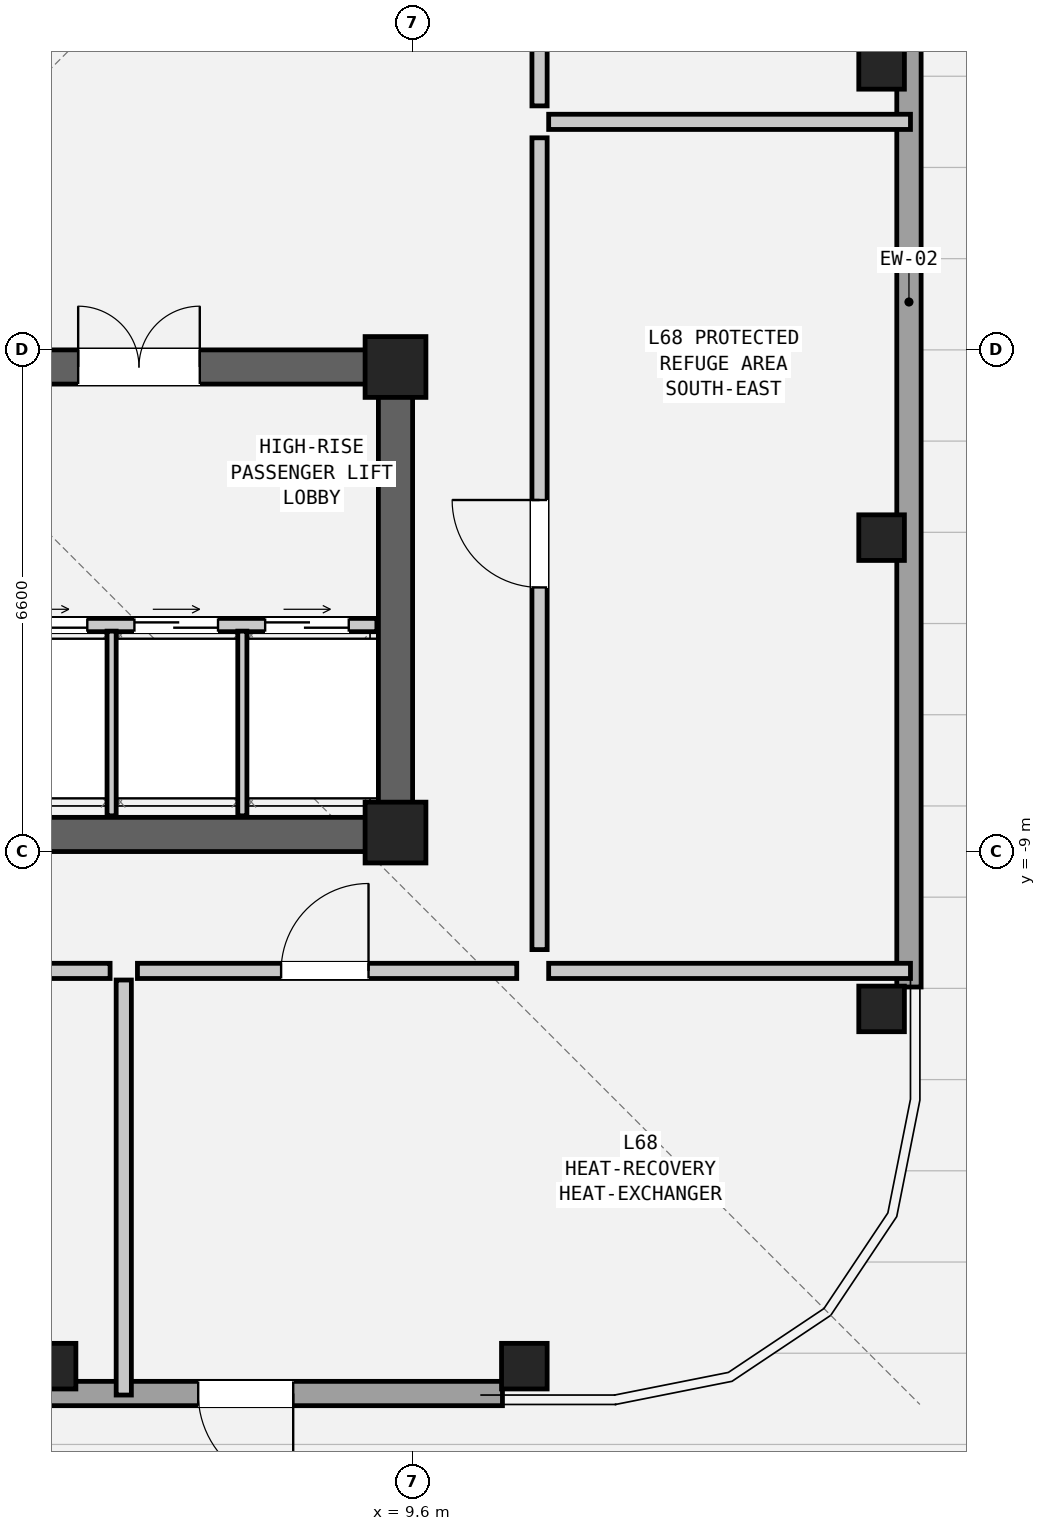
"""IFC4 building model, lengths in metres.
Left out: names, types, materials, properties, quantities, classifications, styles, units other than length and angle.
Written with IfcOpenShell. Run it as: python <this file> out.ifc"""

import sys

from ifc_helpers import new_model, si_unit, direction, frame, frame_2d, origin, origin_2d, place, context, subcontext, project, spatial, rectangle, hollow_rectangle, extrude, element, fill, save


model = new_model("IFC4")
c1 = context("Model", 3, precision=1e-05, world=origin(), true_north=direction((0.0, 1.0)))
c2 = subcontext(c1, "Body", "Model", "MODEL_VIEW")
j1 = project(units=[si_unit("LENGTHUNIT", "METRE"), si_unit("PLANEANGLEUNIT", "RADIAN")], contexts=[c1])
p1 = place(None, origin())
s1 = spatial("IfcSite", under=j1, at=p1, CompositionType="ELEMENT")
p2 = place(p1, origin())
s2 = spatial("IfcBuilding", under=s1, at=p2, CompositionType="ELEMENT")
p3 = place(p2, frame((0.0, 0.0, 231.3)))
s3 = spatial("IfcBuildingStorey", under=s2, at=p3, CompositionType="ELEMENT", Elevation=231.3)
p4 = place(p3, frame((-9.6, -8.775, 0.0), z_axis=(0.0, 0.0, 1.0), x_axis=(1.0, 0.0, 0.0)))
e1 = element("IfcWall", 1, at=p4, inside=s3, PredefinedType="SHEAR", context=c2, shape_type="SweptSolid", body=[
    extrude(rectangle(XDim=19.2, YDim=0.45, at=frame_2d((9.6, 0.0))), origin(), (0.0, 0.0, 1.0), 3.6),
])
p5 = place(p3, frame((-9.6, -2.625, 0.0), z_axis=(0.0, 0.0, 1.0), x_axis=(1.0, 0.0, 0.0)))
e2 = element("IfcWall", 2, at=p5, inside=s3, PredefinedType="SHEAR", context=c2, shape_type="SweptSolid", body=[
    extrude(rectangle(XDim=19.2, YDim=0.45, at=frame_2d((9.6, 0.0))), origin(), (0.0, 0.0, 1.0), 3.6),
])
p6 = place(p5, frame((3.8, 0.0, 0.0)))
e3 = element("IfcOpeningElement", 3, at=p6, cuts=e2, PredefinedType="OPENING", context=c2, shape_type="SweptSolid", body=[
    extrude(rectangle(XDim=1.1, YDim=2.08, at=frame_2d((0.55, 1.04))), frame((0.0, 0.237, 0.0), z_axis=(0.0, -1.0, 0.0), x_axis=(1.0, 0.0, 0.0)), (0.0, 0.0, 1.0), 0.474),
])
p7 = place(p5, frame((10.15, 0.0, 0.0)))
e4 = element("IfcOpeningElement", 4, at=p7, cuts=e2, PredefinedType="OPENING", context=c2, shape_type="SweptSolid", body=[
    extrude(rectangle(XDim=0.9, YDim=2.05, at=frame_2d((0.45, 1.025))), frame((0.0, 0.237, 0.0), z_axis=(0.0, -1.0, 0.0), x_axis=(1.0, 0.0, 0.0)), (0.0, 0.0, 1.0), 0.474),
])
p8 = place(p5, frame((12.1, 0.0, 0.0)))
e5 = element("IfcOpeningElement", 5, at=p8, cuts=e2, PredefinedType="OPENING", context=c2, shape_type="SweptSolid", body=[
    extrude(rectangle(XDim=0.95, YDim=2.1, at=frame_2d((0.475, 1.05))), frame((0.0, 0.237, 0.0), z_axis=(0.0, -1.0, 0.0), x_axis=(1.0, 0.0, 0.0)), (0.0, 0.0, 1.0), 0.474),
])
p9 = place(p5, frame((14.8, 0.0, 0.0)))
e6 = element("IfcOpeningElement", 6, at=p9, cuts=e2, PredefinedType="OPENING", context=c2, shape_type="SweptSolid", body=[
    extrude(rectangle(XDim=1.6, YDim=2.12, at=frame_2d((0.8, 1.06))), frame((0.0, 0.237, 0.0), z_axis=(0.0, -1.0, 0.0), x_axis=(1.0, 0.0, 0.0)), (0.0, 0.0, 1.0), 0.474),
])
p10 = place(p3, frame((9.375, -9.0, 0.0), z_axis=(0.0, 0.0, 1.0), x_axis=(0.0, 1.0, 0.0)))
e7 = element("IfcWall", 7, at=p10, inside=s3, PredefinedType="SHEAR", context=c2, shape_type="SweptSolid", body=[
    extrude(rectangle(XDim=6.6, YDim=0.45, at=frame_2d((3.3, 0.0))), origin(), (0.0, 0.0, 1.0), 3.6),
])
for number, where, z_axis, x_axis in (
    (8, (4.87, -15.77, 0.0), (0.0, 0.0, 1.0), (1.0, 0.0, 0.0)),
    (9, (11.07, -15.77, 0.0), (0.0, 0.0, 1.0), (1.0, 0.0, 0.0)),
    (10, (15.77, -11.07, 0.0), (0.0, 0.0, 1.0), (0.0, 1.0, 0.0)),
    (11, (15.77, -4.87, 0.0), (0.0, 0.0, 1.0), (0.0, 1.0, 0.0)),
    (12, (15.77, 1.33, 0.0), (0.0, 0.0, 1.0), (0.0, 1.0, 0.0)),
):
    element("IfcColumn", number, at=place(p3, frame(where, z_axis=z_axis, x_axis=x_axis)), inside=s3, PredefinedType="COLUMN", context=c2, shape_type="SweptSolid", body=[
        extrude(hollow_rectangle(XDim=0.6, YDim=0.6, WallThickness=0.04, at=origin_2d()), origin(), (0.0, 0.0, 1.0), 3.6),
    ])
for number, where, z_axis, x_axis in (
    (13, (9.375, -2.625, 0.0), (0.0, 0.0, 1.0), (1.0, 0.0, 0.0)),
    (14, (9.375, -8.75, 0.0), (0.0, 0.0, 1.0), (1.0, 0.0, 0.0)),
):
    element("IfcColumn", number, at=place(p3, frame(where, z_axis=z_axis, x_axis=x_axis)), inside=s3, PredefinedType="COLUMN", context=c2, shape_type="SweptSolid", body=[
        extrude(rectangle(XDim=0.8, YDim=0.8, at=origin_2d()), origin(), (0.0, 0.0, 1.0), 3.6),
    ])
p11 = place(p3, frame((10.782, -16.13, 0.0), z_axis=(0.0, 0.0, 1.0), x_axis=(-1.0, 0.0, 0.0)))
e15 = element("IfcWall", 15, at=p11, inside=s3, PredefinedType="SOLIDWALL", context=c2, shape_type="SweptSolid", body=[
    extrude(rectangle(XDim=18.024, YDim=0.32, at=frame_2d((9.012, 0.0))), origin(), (0.0, 0.0, 1.0), 2.182),
])
p12 = place(p11, frame((2.753, 0.0, 0.0)))
e16 = element("IfcOpeningElement", 16, at=p12, cuts=e15, PredefinedType="OPENING", context=c2, shape_type="SweptSolid", body=[
    extrude(rectangle(XDim=1.25, YDim=2.02, at=frame_2d((0.625, 1.01))), frame((0.0, 0.172, 0.0), z_axis=(0.0, -1.0, 0.0), x_axis=(1.0, 0.0, 0.0)), (0.0, 0.0, 1.0), 0.344),
])
p13 = place(p3, frame((16.13, 7.242, 0.0), z_axis=(0.0, 0.0, 1.0), x_axis=(0.0, -1.0, 0.0)))
e17 = element("IfcWall", 17, at=p13, inside=s3, PredefinedType="SOLIDWALL", context=c2, shape_type="SweptSolid", body=[
    extrude(rectangle(XDim=18.024, YDim=0.32, at=frame_2d((9.012, 0.0))), origin(), (0.0, 0.0, 1.0), 2.182),
])
p14 = place(p3, frame((4.0, -6.02, 0.0), z_axis=(0.0, 0.0, 1.0), x_axis=(1.0, 0.0, 0.0)))
e18 = element("IfcWall", 18, at=p14, inside=s3, PredefinedType="PARTITIONING", context=c2, shape_type="SweptSolid", body=[
    extrude(rectangle(XDim=5.13, YDim=0.175, at=frame_2d((2.565, 0.0))), origin(), (0.0, 0.0, 1.0), 3.32),
])
p15 = place(p14, frame((0.22, 0.0, 0.0)))
e19 = element("IfcOpeningElement", 19, at=p15, cuts=e18, PredefinedType="OPENING", context=c2, shape_type="SweptSolid", body=[
    extrude(rectangle(XDim=1.1, YDim=2.06, at=frame_2d((0.55, 1.03))), frame((0.0, 0.1, 0.0), z_axis=(0.0, -1.0, 0.0), x_axis=(1.0, 0.0, 0.0)), (0.0, 0.0, 1.0), 0.199),
])
p16 = place(p14, frame((1.94, 0.0, 0.0)))
e20 = element("IfcOpeningElement", 20, at=p16, cuts=e18, PredefinedType="OPENING", context=c2, shape_type="SweptSolid", body=[
    extrude(rectangle(XDim=1.1, YDim=2.06, at=frame_2d((0.55, 1.03))), frame((0.0, 0.1, 0.0), z_axis=(0.0, -1.0, 0.0), x_axis=(1.0, 0.0, 0.0)), (0.0, 0.0, 1.0), 0.199),
])
p17 = place(p14, frame((3.66, 0.0, 0.0)))
e21 = element("IfcOpeningElement", 21, at=p17, cuts=e18, PredefinedType="OPENING", context=c2, shape_type="SweptSolid", body=[
    extrude(rectangle(XDim=1.1, YDim=2.06, at=frame_2d((0.55, 1.03))), frame((0.0, 0.1, 0.0), z_axis=(0.0, -1.0, 0.0), x_axis=(1.0, 0.0, 0.0)), (0.0, 0.0, 1.0), 0.199),
])
for number, where, z_axis, x_axis in (
    (22, (5.64, -8.53, 0.0), (0.0, 0.0, 1.0), (0.0, 1.0, 0.0)),
    (23, (7.36, -8.53, 0.0), (0.0, 0.0, 1.0), (0.0, 1.0, 0.0)),
):
    element("IfcWall", number, at=place(p3, frame(where, z_axis=z_axis, x_axis=x_axis)), inside=s3, PredefinedType="PARTITIONING", context=c2, shape_type="SweptSolid", body=[
        extrude(rectangle(XDim=2.43, YDim=0.12, at=frame_2d((1.215, 0.0))), origin(), (0.0, 0.0, 1.0), 3.32),
    ])
p18 = place(p3, frame((0.53, -10.57, 0.0), z_axis=(0.0, 0.0, 1.0), x_axis=(1.0, 0.0, 0.0)))
e24 = element("IfcWall", 24, at=p18, inside=s3, PredefinedType="PARTITIONING", context=c2, shape_type="SweptSolid", body=[
    extrude(rectangle(XDim=5.09, YDim=0.2, at=frame_2d((2.545, 0.0))), origin(), (0.0, 0.0, 1.0), 3.32),
])
p19 = place(p18, frame((1.97, 0.0, 0.0)))
e25 = element("IfcOpeningElement", 25, at=p19, cuts=e24, PredefinedType="OPENING", context=c2, shape_type="SweptSolid", body=[
    extrude(rectangle(XDim=1.15, YDim=2.1, at=frame_2d((0.575, 1.05))), frame((0.0, 0.112, 0.0), z_axis=(0.0, -1.0, 0.0), x_axis=(1.0, 0.0, 0.0)), (0.0, 0.0, 1.0), 0.224),
])
p20 = place(p3, frame((5.8, -16.15, 0.0), z_axis=(0.0, 0.0, 1.0), x_axis=(0.0, 1.0, 0.0)))
e26 = element("IfcWall", 26, at=p20, inside=s3, PredefinedType="PARTITIONING", context=c2, shape_type="SweptSolid", body=[
    extrude(rectangle(XDim=5.46, YDim=0.2, at=frame_2d((2.73, 0.0))), origin(), (0.0, 0.0, 1.0), 2.538),
])
p21 = place(p3, frame((5.98, -10.57, 0.0), z_axis=(0.0, 0.0, 1.0), x_axis=(1.0, 0.0, 0.0)))
e27 = element("IfcWall", 27, at=p21, inside=s3, PredefinedType="PARTITIONING", context=c2, shape_type="SweptSolid", body=[
    extrude(rectangle(XDim=4.99, YDim=0.2, at=frame_2d((2.495, 0.0))), origin(), (0.0, 0.0, 1.0), 3.32),
])
p22 = place(p21, frame((1.89, 0.0, 0.0)))
e28 = element("IfcOpeningElement", 28, at=p22, cuts=e27, PredefinedType="OPENING", context=c2, shape_type="SweptSolid", body=[
    extrude(rectangle(XDim=1.15, YDim=2.1, at=frame_2d((0.575, 1.05))), frame((0.0, 0.112, 0.0), z_axis=(0.0, -1.0, 0.0), x_axis=(1.0, 0.0, 0.0)), (0.0, 0.0, 1.0), 0.224),
])
p23 = place(p3, frame((11.39, -10.57, 0.0), z_axis=(0.0, 0.0, 1.0), x_axis=(1.0, 0.0, 0.0)))
e29 = element("IfcWall", 29, at=p23, inside=s3, PredefinedType="PARTITIONING", context=c2, shape_type="SweptSolid", body=[
    extrude(rectangle(XDim=4.76, YDim=0.2, at=frame_2d((2.38, 0.0))), origin(), (0.0, 0.0, 1.0), 3.32),
])
p24 = place(p3, frame((11.39, 0.6, 0.0), z_axis=(0.0, 0.0, 1.0), x_axis=(1.0, 0.0, 0.0)))
e30 = element("IfcWall", 30, at=p24, inside=s3, PredefinedType="PARTITIONING", context=c2, shape_type="SweptSolid", body=[
    extrude(rectangle(XDim=4.76, YDim=0.2, at=frame_2d((2.38, 0.0))), origin(), (0.0, 0.0, 1.0), 2.538),
])
p25 = place(p3, frame((11.27, -10.29, 0.0), z_axis=(0.0, 0.0, 1.0), x_axis=(0.0, 1.0, 0.0)))
e31 = element("IfcWall", 31, at=p25, inside=s3, PredefinedType="PARTITIONING", context=c2, shape_type="SweptSolid", body=[
    extrude(rectangle(XDim=10.68, YDim=0.2, at=frame_2d((5.34, 0.0))), origin(), (0.0, 0.0, 1.0), 3.32),
])
p26 = place(p25, frame((4.765, 0.0, 0.0)))
e32 = element("IfcOpeningElement", 32, at=p26, cuts=e31, PredefinedType="OPENING", context=c2, shape_type="SweptSolid", body=[
    extrude(rectangle(XDim=1.15, YDim=2.1, at=frame_2d((0.575, 1.05))), frame((0.0, 0.112, 0.0), z_axis=(0.0, -1.0, 0.0), x_axis=(1.0, 0.0, 0.0)), (0.0, 0.0, 1.0), 0.224),
])
p27 = place(p3, frame((11.27, 0.81, 0.0), z_axis=(0.0, 0.0, 1.0), x_axis=(0.0, 1.0, 0.0)))
e33 = element("IfcWall", 33, at=p27, inside=s3, PredefinedType="PARTITIONING", context=c2, shape_type="SweptSolid", body=[
    extrude(rectangle(XDim=10.68, YDim=0.2, at=frame_2d((5.34, 0.0))), origin(), (0.0, 0.0, 1.0), 3.32),
])
p28 = place(p27, frame((6.047, 0.0, 0.0)))
e34 = element("IfcOpeningElement", 34, at=p28, cuts=e33, PredefinedType="OPENING", context=c2, shape_type="SweptSolid", body=[
    extrude(rectangle(XDim=1.15, YDim=2.1, at=frame_2d((0.575, 1.05))), frame((0.0, 0.112, 0.0), z_axis=(0.0, -1.0, 0.0), x_axis=(1.0, 0.0, 0.0)), (0.0, 0.0, 1.0), 0.224),
])
p29 = place(p12, origin())
e35 = element("IfcDoor", 35, at=p29, inside=s3, OperationType="SINGLE_SWING_LEFT", PredefinedType="DOOR", context=c2, shape_type="SweptSolid", body=[
    extrude(rectangle(XDim=1.25, YDim=2.02, at=frame_2d((0.625, 1.01))), frame((0.0, 0.025, 0.0), z_axis=(0.0, -1.0, 0.0), x_axis=(1.0, 0.0, 0.0)), (0.0, 0.0, 1.0), 0.05),
])
fill(e16, e35)
p30 = place(p15, origin())
e36 = element("IfcDoor", 36, at=p30, inside=s3, OperationType="DOUBLE_DOOR_SLIDING", PredefinedType="DOOR", context=c2, shape_type="SweptSolid", body=[
    extrude(rectangle(XDim=1.1, YDim=2.06, at=frame_2d((0.55, 1.03))), frame((0.0, 0.025, 0.0), z_axis=(0.0, -1.0, 0.0), x_axis=(1.0, 0.0, 0.0)), (0.0, 0.0, 1.0), 0.05),
])
fill(e19, e36)
p31 = place(p16, origin())
e37 = element("IfcDoor", 37, at=p31, inside=s3, OperationType="DOUBLE_DOOR_SLIDING", PredefinedType="DOOR", context=c2, shape_type="SweptSolid", body=[
    extrude(rectangle(XDim=1.1, YDim=2.06, at=frame_2d((0.55, 1.03))), frame((0.0, 0.025, 0.0), z_axis=(0.0, -1.0, 0.0), x_axis=(1.0, 0.0, 0.0)), (0.0, 0.0, 1.0), 0.05),
])
fill(e20, e37)
p32 = place(p17, origin())
e38 = element("IfcDoor", 38, at=p32, inside=s3, OperationType="DOUBLE_DOOR_SLIDING", PredefinedType="DOOR", context=c2, shape_type="SweptSolid", body=[
    extrude(rectangle(XDim=1.1, YDim=2.06, at=frame_2d((0.55, 1.03))), frame((0.0, 0.025, 0.0), z_axis=(0.0, -1.0, 0.0), x_axis=(1.0, 0.0, 0.0)), (0.0, 0.0, 1.0), 0.05),
])
fill(e21, e38)
p33 = place(p9, origin())
e39 = element("IfcDoor", 39, at=p33, inside=s3, OperationType="DOUBLE_DOOR_SINGLE_SWING", PredefinedType="DOOR", context=c2, shape_type="SweptSolid", body=[
    extrude(rectangle(XDim=1.6, YDim=2.12, at=frame_2d((0.8, 1.06))), frame((0.0, 0.025, 0.0), z_axis=(0.0, -1.0, 0.0), x_axis=(1.0, 0.0, 0.0)), (0.0, 0.0, 1.0), 0.05),
])
fill(e6, e39)
p34 = place(p22, origin())
e40 = element("IfcDoor", 40, at=p34, inside=s3, OperationType="SINGLE_SWING_RIGHT", PredefinedType="DOOR", context=c2, shape_type="SweptSolid", body=[
    extrude(rectangle(XDim=1.15, YDim=2.1, at=frame_2d((0.575, 1.05))), frame((0.0, 0.025, 0.0), z_axis=(0.0, -1.0, 0.0), x_axis=(1.0, 0.0, 0.0)), (0.0, 0.0, 1.0), 0.05),
])
fill(e28, e40)
p35 = place(p26, origin())
e41 = element("IfcDoor", 41, at=p35, inside=s3, OperationType="SINGLE_SWING_RIGHT", PredefinedType="DOOR", context=c2, shape_type="SweptSolid", body=[
    extrude(rectangle(XDim=1.15, YDim=2.1, at=frame_2d((0.575, 1.05))), frame((0.0, 0.025, 0.0), z_axis=(0.0, -1.0, 0.0), x_axis=(1.0, 0.0, 0.0)), (0.0, 0.0, 1.0), 0.05),
])
fill(e32, e41)
save(model, sys.argv[1])
